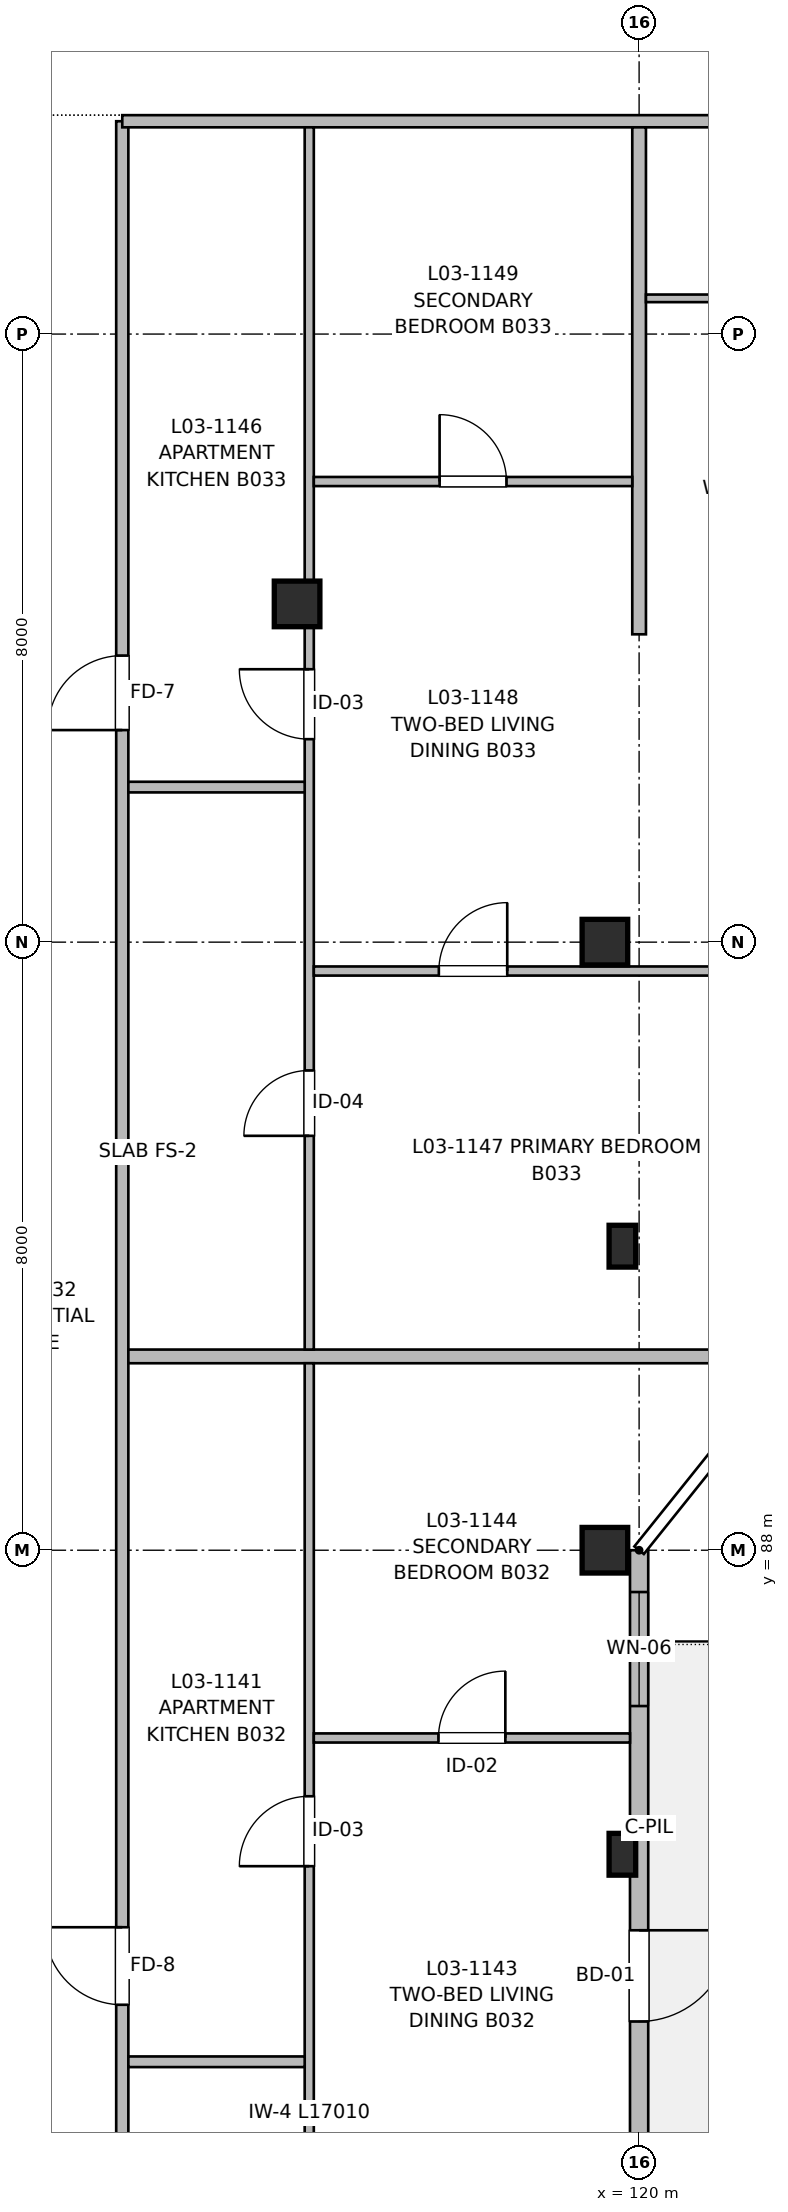
"""IFC4 building model, lengths in metres.
Left out: names, types, materials, properties, quantities, classifications, styles, units other than length and angle.
Written with IfcOpenShell. Run it as: python <this file> out.ifc"""

import sys

from ifc_helpers import new_model, si_unit, direction, frame, frame_2d, origin, origin_2d, place, context, subcontext, project, spatial, rectangle, extrude, element, fill, save


model = new_model("IFC4")
c1 = context("Model", 3, precision=1e-05, world=origin(), true_north=direction((0.0, 1.0)))
c2 = subcontext(c1, "Body", "Model", "MODEL_VIEW")
j1 = project(units=[si_unit("LENGTHUNIT", "METRE"), si_unit("PLANEANGLEUNIT", "RADIAN")], contexts=[c1])
p1 = place(None, origin())
s1 = spatial("IfcSite", under=j1, at=p1, CompositionType="ELEMENT")
p2 = place(p1, origin())
s2 = spatial("IfcBuilding", under=s1, at=p2, CompositionType="ELEMENT")
p3 = place(p2, frame((0.0, 0.0, 10.56)))
s3 = spatial("IfcBuildingStorey", under=s2, at=p3, CompositionType="ELEMENT", Elevation=10.56)
for number, where, z_axis, x_axis in (
    (1, (115.5, 100.45, 0.0), (0.0, 0.0, 1.0), (1.0, 0.0, 0.0)),
    (2, (119.55, 88.0, 0.0), (0.0, 0.0, 1.0), (1.0, 0.0, 0.0)),
    (3, (119.55, 96.0, 0.0), (0.0, 0.0, 1.0), (1.0, 0.0, 0.0)),
):
    element("IfcColumn", number, at=place(p3, frame(where, z_axis=z_axis, x_axis=x_axis)), inside=s3, PredefinedType="COLUMN", context=c2, shape_type="SweptSolid", body=[
        extrude(rectangle(XDim=0.6, YDim=0.6, at=origin_2d()), origin(), (0.0, 0.0, 1.0), 3.2),
    ])
for number, where, z_axis, x_axis in (
    (4, (119.78, 84.0, 0.0), (0.0, 0.0, 1.0), (1.0, 0.0, 0.0)),
    (5, (119.78, 92.0, 0.0), (0.0, 0.0, 1.0), (1.0, 0.0, 0.0)),
):
    element("IfcColumn", number, at=place(p3, frame(where, z_axis=z_axis, x_axis=x_axis)), inside=s3, PredefinedType="PILASTER", context=c2, shape_type="SweptSolid", body=[
        extrude(rectangle(XDim=0.35, YDim=0.55, at=origin_2d()), origin(), (0.0, 0.0, 1.0), 3.2),
    ])
p4 = place(p3, frame((120.0, 88.0, 0.0), z_axis=(0.0, 0.0, 1.0), x_axis=(0.0, -1.0, 0.0)))
e6 = element("IfcWall", 6, at=p4, inside=s3, PredefinedType="SOLIDWALL", context=c2, shape_type="SweptSolid", body=[
    extrude(rectangle(XDim=32.0, YDim=0.24, at=frame_2d((16.0, 0.0))), origin(), (0.0, 0.0, 1.0), 2.98),
])
p5 = place(p4, frame((5.0, 0.0, 0.0)))
e7 = element("IfcOpeningElement", 7, at=p5, cuts=e6, PredefinedType="OPENING", context=c2, shape_type="SweptSolid", body=[
    extrude(rectangle(XDim=1.2, YDim=2.2, at=frame_2d((0.6, 1.1))), frame((0.0, 0.13, 0.0), z_axis=(0.0, -1.0, 0.0), x_axis=(1.0, 0.0, 0.0)), (0.0, 0.0, 1.0), 0.26),
])
p6 = place(p4, frame((11.15, 0.0, 0.72)))
e8 = element("IfcOpeningElement", 8, at=p6, cuts=e6, PredefinedType="OPENING", context=c2, shape_type="SweptSolid", body=[
    extrude(rectangle(XDim=1.7, YDim=1.5, at=frame_2d((0.85, 0.75))), frame((0.0, 0.13, 0.0), z_axis=(0.0, -1.0, 0.0), x_axis=(1.0, 0.0, 0.0)), (0.0, 0.0, 1.0), 0.26),
])
p7 = place(p4, frame((20.65, 0.0, 0.57)))
e9 = element("IfcOpeningElement", 9, at=p7, cuts=e6, PredefinedType="OPENING", context=c2, shape_type="SweptSolid", body=[
    extrude(rectangle(XDim=2.3, YDim=1.65, at=frame_2d((1.15, 0.825))), frame((0.0, 0.13, 0.0), z_axis=(0.0, -1.0, 0.0), x_axis=(1.0, 0.0, 0.0)), (0.0, 0.0, 1.0), 0.26),
])
p8 = place(p4, frame((27.275, 0.0, 0.77)))
e10 = element("IfcOpeningElement", 10, at=p8, cuts=e6, PredefinedType="OPENING", context=c2, shape_type="SweptSolid", body=[
    extrude(rectangle(XDim=1.45, YDim=1.45, at=frame_2d((0.725, 0.725))), frame((0.0, 0.13, 0.0), z_axis=(0.0, -1.0, 0.0), x_axis=(1.0, 0.0, 0.0)), (0.0, 0.0, 1.0), 0.26),
])
p9 = place(p4, frame((16.435, 0.0, 0.82)))
e11 = element("IfcOpeningElement", 11, at=p9, cuts=e6, PredefinedType="OPENING", context=c2, shape_type="SweptSolid", body=[
    extrude(rectangle(XDim=1.5, YDim=1.4, at=frame_2d((0.75, 0.7))), frame((0.0, 0.13, 0.0), z_axis=(0.0, -1.0, 0.0), x_axis=(1.0, 0.0, 0.0)), (0.0, 0.0, 1.0), 0.26),
])
p10 = place(p4, frame((0.55, 0.0, 0.82)))
e12 = element("IfcOpeningElement", 12, at=p10, cuts=e6, PredefinedType="OPENING", context=c2, shape_type="SweptSolid", body=[
    extrude(rectangle(XDim=1.5, YDim=1.4, at=frame_2d((0.75, 0.7))), frame((0.0, 0.13, 0.0), z_axis=(0.0, -1.0, 0.0), x_axis=(1.0, 0.0, 0.0)), (0.0, 0.0, 1.0), 0.26),
])
p11 = place(p3, frame((113.2, 56.18, 0.0), z_axis=(0.0, 0.0, 1.0), x_axis=(0.0, 1.0, 0.0)))
e13 = element("IfcWall", 13, at=p11, inside=s3, PredefinedType="PARTITIONING", context=c2, shape_type="SweptSolid", body=[
    extrude(rectangle(XDim=50.62, YDim=0.16, at=frame_2d((25.31, 0.0))), origin(), (0.0, 0.0, 1.0), 2.935),
])
p12 = place(p11, frame((8.61, 0.0, 0.0)))
e14 = element("IfcOpeningElement", 14, at=p12, cuts=e13, PredefinedType="OPENING", context=c2, shape_type="SweptSolid", body=[
    extrude(rectangle(XDim=0.98, YDim=2.15, at=frame_2d((0.49, 1.075))), frame((0.0, 0.09, 0.0), z_axis=(0.0, -1.0, 0.0), x_axis=(1.0, 0.0, 0.0)), (0.0, 0.0, 1.0), 0.18),
])
p13 = place(p11, frame((25.84, 0.0, 0.0)))
e15 = element("IfcOpeningElement", 15, at=p13, cuts=e13, PredefinedType="OPENING", context=c2, shape_type="SweptSolid", body=[
    extrude(rectangle(XDim=1.02, YDim=2.15, at=frame_2d((0.51, 1.075))), frame((0.0, 0.09, 0.0), z_axis=(0.0, -1.0, 0.0), x_axis=(1.0, 0.0, 0.0)), (0.0, 0.0, 1.0), 0.18),
])
p14 = place(p11, frame((42.61, 0.0, 0.0)))
e16 = element("IfcOpeningElement", 16, at=p14, cuts=e13, PredefinedType="OPENING", context=c2, shape_type="SweptSolid", body=[
    extrude(rectangle(XDim=0.98, YDim=2.15, at=frame_2d((0.49, 1.075))), frame((0.0, 0.09, 0.0), z_axis=(0.0, -1.0, 0.0), x_axis=(1.0, 0.0, 0.0)), (0.0, 0.0, 1.0), 0.18),
])
p15 = place(p3, frame((113.2, 106.8, 0.0), z_axis=(0.0, 0.0, 1.0), x_axis=(1.0, 0.0, 0.0)))
e17 = element("IfcWall", 17, at=p15, inside=s3, PredefinedType="PARTITIONING", context=c2, shape_type="SweptSolid", body=[
    extrude(rectangle(XDim=24.12, YDim=0.16, at=frame_2d((12.06, 0.0))), origin(), (0.0, 0.0, 1.0), 2.935),
])
p16 = place(p15, frame((19.575, 0.0, 0.0)))
e18 = element("IfcOpeningElement", 18, at=p16, cuts=e17, PredefinedType="OPENING", context=c2, shape_type="SweptSolid", body=[
    extrude(rectangle(XDim=1.05, YDim=2.15, at=frame_2d((0.525, 1.075))), frame((0.0, 0.09, 0.0), z_axis=(0.0, -1.0, 0.0), x_axis=(1.0, 0.0, 0.0)), (0.0, 0.0, 1.0), 0.18),
])
p17 = place(p15, frame((8.995, 0.0, 0.0)))
e19 = element("IfcOpeningElement", 19, at=p17, cuts=e17, PredefinedType="OPENING", context=c2, shape_type="SweptSolid", body=[
    extrude(rectangle(XDim=0.98, YDim=2.15, at=frame_2d((0.49, 1.075))), frame((0.0, 0.09, 0.0), z_axis=(0.0, -1.0, 0.0), x_axis=(1.0, 0.0, 0.0)), (0.0, 0.0, 1.0), 0.18),
])
p18 = place(p3, frame((120.0, 100.05, 0.0), z_axis=(0.0, 0.0, 1.0), x_axis=(0.0, 1.0, 0.0)))
e20 = element("IfcWall", 20, at=p18, inside=s3, PredefinedType="PARTITIONING", context=c2, shape_type="SweptSolid", body=[
    extrude(rectangle(XDim=6.67, YDim=0.18, at=frame_2d((3.335, 0.0))), origin(), (0.0, 0.0, 1.0), 2.935),
])
p19 = place(p3, frame((113.28, 90.55, 0.0), z_axis=(0.0, 0.0, 1.0), x_axis=(1.0, 0.0, 0.0)))
e21 = element("IfcWall", 21, at=p19, inside=s3, PredefinedType="PARTITIONING", context=c2, shape_type="SweptSolid", body=[
    extrude(rectangle(XDim=8.714, YDim=0.18, at=frame_2d((4.357, 0.0))), origin(), (0.0, 0.0, 1.0), 2.935),
])
p20 = place(p3, frame((115.66, 73.45, 0.0), z_axis=(0.0, 0.0, 1.0), x_axis=(0.0, 1.0, 0.0)))
e22 = element("IfcWall", 22, at=p20, inside=s3, PredefinedType="PARTITIONING", context=c2, shape_type="SweptSolid", body=[
    extrude(rectangle(XDim=17.01, YDim=0.12, at=frame_2d((8.505, 0.0))), origin(), (0.0, 0.0, 1.0), 2.935),
])
p21 = place(p20, frame((2.972, 0.0, 0.0)))
e23 = element("IfcOpeningElement", 23, at=p21, cuts=e22, PredefinedType="OPENING", context=c2, shape_type="SweptSolid", body=[
    extrude(rectangle(XDim=0.94, YDim=2.1, at=frame_2d((0.47, 1.05))), frame((0.0, 0.07, 0.0), z_axis=(0.0, -1.0, 0.0), x_axis=(1.0, 0.0, 0.0)), (0.0, 0.0, 1.0), 0.14),
])
p22 = place(p20, frame((10.393, 0.0, 0.0)))
e24 = element("IfcOpeningElement", 24, at=p22, cuts=e22, PredefinedType="OPENING", context=c2, shape_type="SweptSolid", body=[
    extrude(rectangle(XDim=0.92, YDim=2.1, at=frame_2d((0.46, 1.05))), frame((0.0, 0.07, 0.0), z_axis=(0.0, -1.0, 0.0), x_axis=(1.0, 0.0, 0.0)), (0.0, 0.0, 1.0), 0.14),
])
p23 = place(p3, frame((113.28, 81.27, 0.0), z_axis=(0.0, 0.0, 1.0), x_axis=(1.0, 0.0, 0.0)))
e25 = element("IfcWall", 25, at=p23, inside=s3, PredefinedType="PARTITIONING", context=c2, shape_type="SweptSolid", body=[
    extrude(rectangle(XDim=2.32, YDim=0.14, at=frame_2d((1.16, 0.0))), origin(), (0.0, 0.0, 1.0), 2.935),
])
p24 = place(p3, frame((115.72, 85.53, 0.0), z_axis=(0.0, 0.0, 1.0), x_axis=(1.0, 0.0, 0.0)))
e26 = element("IfcWall", 26, at=p24, inside=s3, PredefinedType="PARTITIONING", context=c2, shape_type="SweptSolid", body=[
    extrude(rectangle(XDim=4.16, YDim=0.12, at=frame_2d((2.08, 0.0))), origin(), (0.0, 0.0, 1.0), 2.935),
])
p25 = place(p24, frame((1.64, 0.0, 0.0)))
e27 = element("IfcOpeningElement", 27, at=p25, cuts=e26, PredefinedType="OPENING", context=c2, shape_type="SweptSolid", body=[
    extrude(rectangle(XDim=0.88, YDim=2.1, at=frame_2d((0.44, 1.05))), frame((0.0, 0.07, 0.0), z_axis=(0.0, -1.0, 0.0), x_axis=(1.0, 0.0, 0.0)), (0.0, 0.0, 1.0), 0.14),
])
p26 = place(p3, frame((115.66, 90.64, 0.0), z_axis=(0.0, 0.0, 1.0), x_axis=(0.0, 1.0, 0.0)))
e28 = element("IfcWall", 28, at=p26, inside=s3, PredefinedType="PARTITIONING", context=c2, shape_type="SweptSolid", body=[
    extrude(rectangle(XDim=16.08, YDim=0.12, at=frame_2d((8.04, 0.0))), origin(), (0.0, 0.0, 1.0), 2.68),
])
p27 = place(p26, frame((2.812, 0.0, 0.0)))
e29 = element("IfcOpeningElement", 29, at=p27, cuts=e28, PredefinedType="OPENING", context=c2, shape_type="SweptSolid", body=[
    extrude(rectangle(XDim=0.86, YDim=2.1, at=frame_2d((0.43, 1.05))), frame((0.0, 0.07, 0.0), z_axis=(0.0, -1.0, 0.0), x_axis=(1.0, 0.0, 0.0)), (0.0, 0.0, 1.0), 0.14),
])
p28 = place(p26, frame((8.031, 0.0, 0.0)))
e30 = element("IfcOpeningElement", 30, at=p28, cuts=e28, PredefinedType="OPENING", context=c2, shape_type="SweptSolid", body=[
    extrude(rectangle(XDim=0.92, YDim=2.1, at=frame_2d((0.46, 1.05))), frame((0.0, 0.07, 0.0), z_axis=(0.0, -1.0, 0.0), x_axis=(1.0, 0.0, 0.0)), (0.0, 0.0, 1.0), 0.14),
])
p29 = place(p3, frame((113.28, 98.04, 0.0), z_axis=(0.0, 0.0, 1.0), x_axis=(1.0, 0.0, 0.0)))
e31 = element("IfcWall", 31, at=p29, inside=s3, PredefinedType="PARTITIONING", context=c2, shape_type="SweptSolid", body=[
    extrude(rectangle(XDim=2.32, YDim=0.14, at=frame_2d((1.16, 0.0))), origin(), (0.0, 0.0, 1.0), 2.935),
])
p30 = place(p3, frame((115.72, 95.62, 0.0), z_axis=(0.0, 0.0, 1.0), x_axis=(1.0, 0.0, 0.0)))
e32 = element("IfcWall", 32, at=p30, inside=s3, PredefinedType="PARTITIONING", context=c2, shape_type="SweptSolid", body=[
    extrude(rectangle(XDim=10.968, YDim=0.12, at=frame_2d((5.484, 0.0))), origin(), (0.0, 0.0, 1.0), 2.935),
])
p31 = place(p30, frame((1.645, 0.0, 0.0)))
e33 = element("IfcOpeningElement", 33, at=p31, cuts=e32, PredefinedType="OPENING", context=c2, shape_type="SweptSolid", body=[
    extrude(rectangle(XDim=0.9, YDim=2.1, at=frame_2d((0.45, 1.05))), frame((0.0, 0.07, 0.0), z_axis=(0.0, -1.0, 0.0), x_axis=(1.0, 0.0, 0.0)), (0.0, 0.0, 1.0), 0.14),
])
p32 = place(p3, frame((115.72, 102.06, 0.0), z_axis=(0.0, 0.0, 1.0), x_axis=(1.0, 0.0, 0.0)))
e34 = element("IfcWall", 34, at=p32, inside=s3, PredefinedType="PARTITIONING", context=c2, shape_type="SweptSolid", body=[
    extrude(rectangle(XDim=4.19, YDim=0.12, at=frame_2d((2.095, 0.0))), origin(), (0.0, 0.0, 1.0), 2.935),
])
p33 = place(p32, frame((1.655, 0.0, 0.0)))
e35 = element("IfcOpeningElement", 35, at=p33, cuts=e34, PredefinedType="OPENING", context=c2, shape_type="SweptSolid", body=[
    extrude(rectangle(XDim=0.88, YDim=2.1, at=frame_2d((0.44, 1.05))), frame((0.0, 0.07, 0.0), z_axis=(0.0, -1.0, 0.0), x_axis=(1.0, 0.0, 0.0)), (0.0, 0.0, 1.0), 0.14),
])
p34 = place(p3, frame((120.09, 104.47, 0.0), z_axis=(0.0, 0.0, 1.0), x_axis=(1.0, 0.0, 0.0)))
e36 = element("IfcWall", 36, at=p34, inside=s3, PredefinedType="PARTITIONING", context=c2, shape_type="SweptSolid", body=[
    extrude(rectangle(XDim=5.13, YDim=0.1, at=frame_2d((2.565, 0.0))), origin(), (0.0, 0.0, 1.0), 2.935),
])
p35 = place(p34, frame((2.18, 0.0, 0.0)))
e37 = element("IfcOpeningElement", 37, at=p35, cuts=e36, PredefinedType="OPENING", context=c2, shape_type="SweptSolid", body=[
    extrude(rectangle(XDim=0.92, YDim=2.1, at=frame_2d((0.46, 1.05))), frame((0.0, 0.06, 0.0), z_axis=(0.0, -1.0, 0.0), x_axis=(1.0, 0.0, 0.0)), (0.0, 0.0, 1.0), 0.12),
])
p36 = place(p5, origin())
e38 = element("IfcDoor", 38, at=p36, inside=s3, OperationType="SINGLE_SWING_LEFT", PredefinedType="DOOR", context=c2, shape_type="SweptSolid", body=[
    extrude(rectangle(XDim=1.2, YDim=2.2, at=frame_2d((0.6, 1.1))), frame((0.0, 0.025, 0.0), z_axis=(0.0, -1.0, 0.0), x_axis=(1.0, 0.0, 0.0)), (0.0, 0.0, 1.0), 0.05),
])
fill(e7, e38)
p37 = place(p22, origin())
e39 = element("IfcDoor", 39, at=p37, inside=s3, OperationType="SINGLE_SWING_LEFT", PredefinedType="DOOR", context=c2, shape_type="SweptSolid", body=[
    extrude(rectangle(XDim=0.92, YDim=2.1, at=frame_2d((0.46, 1.05))), frame((0.0, 0.025, 0.0), z_axis=(0.0, -1.0, 0.0), x_axis=(1.0, 0.0, 0.0)), (0.0, 0.0, 1.0), 0.05),
])
fill(e24, e39)
p38 = place(p13, origin())
e40 = element("IfcDoor", 40, at=p38, inside=s3, OperationType="SINGLE_SWING_RIGHT", PredefinedType="DOOR", context=c2, shape_type="SweptSolid", body=[
    extrude(rectangle(XDim=1.02, YDim=2.15, at=frame_2d((0.51, 1.075))), frame((0.0, 0.025, 0.0), z_axis=(0.0, -1.0, 0.0), x_axis=(1.0, 0.0, 0.0)), (0.0, 0.0, 1.0), 0.05),
])
fill(e15, e40)
p39 = place(p25, origin())
e41 = element("IfcDoor", 41, at=p39, inside=s3, OperationType="SINGLE_SWING_RIGHT", PredefinedType="DOOR", context=c2, shape_type="SweptSolid", body=[
    extrude(rectangle(XDim=0.88, YDim=2.1, at=frame_2d((0.44, 1.05))), frame((0.0, 0.025, 0.0), z_axis=(0.0, -1.0, 0.0), x_axis=(1.0, 0.0, 0.0)), (0.0, 0.0, 1.0), 0.05),
])
fill(e27, e41)
p40 = place(p27, origin())
e42 = element("IfcDoor", 42, at=p40, inside=s3, OperationType="SINGLE_SWING_LEFT", PredefinedType="DOOR", context=c2, shape_type="SweptSolid", body=[
    extrude(rectangle(XDim=0.86, YDim=2.1, at=frame_2d((0.43, 1.05))), frame((0.0, 0.025, 0.0), z_axis=(0.0, -1.0, 0.0), x_axis=(1.0, 0.0, 0.0)), (0.0, 0.0, 1.0), 0.05),
])
fill(e29, e42)
p41 = place(p28, origin())
e43 = element("IfcDoor", 43, at=p41, inside=s3, OperationType="SINGLE_SWING_RIGHT", PredefinedType="DOOR", context=c2, shape_type="SweptSolid", body=[
    extrude(rectangle(XDim=0.92, YDim=2.1, at=frame_2d((0.46, 1.05))), frame((0.0, 0.025, 0.0), z_axis=(0.0, -1.0, 0.0), x_axis=(1.0, 0.0, 0.0)), (0.0, 0.0, 1.0), 0.05),
])
fill(e30, e43)
p42 = place(p14, origin())
e44 = element("IfcDoor", 44, at=p42, inside=s3, OperationType="SINGLE_SWING_LEFT", PredefinedType="DOOR", context=c2, shape_type="SweptSolid", body=[
    extrude(rectangle(XDim=0.98, YDim=2.15, at=frame_2d((0.49, 1.075))), frame((0.0, 0.025, 0.0), z_axis=(0.0, -1.0, 0.0), x_axis=(1.0, 0.0, 0.0)), (0.0, 0.0, 1.0), 0.05),
])
fill(e16, e44)
p43 = place(p31, origin())
e45 = element("IfcDoor", 45, at=p43, inside=s3, OperationType="SINGLE_SWING_RIGHT", PredefinedType="DOOR", context=c2, shape_type="SweptSolid", body=[
    extrude(rectangle(XDim=0.9, YDim=2.1, at=frame_2d((0.45, 1.05))), frame((0.0, 0.025, 0.0), z_axis=(0.0, -1.0, 0.0), x_axis=(1.0, 0.0, 0.0)), (0.0, 0.0, 1.0), 0.05),
])
fill(e33, e45)
p44 = place(p33, origin())
e46 = element("IfcDoor", 46, at=p44, inside=s3, OperationType="SINGLE_SWING_LEFT", PredefinedType="DOOR", context=c2, shape_type="SweptSolid", body=[
    extrude(rectangle(XDim=0.88, YDim=2.1, at=frame_2d((0.44, 1.05))), frame((0.0, 0.025, 0.0), z_axis=(0.0, -1.0, 0.0), x_axis=(1.0, 0.0, 0.0)), (0.0, 0.0, 1.0), 0.05),
])
fill(e35, e46)
p45 = place(p10, origin())
e47 = element("IfcWindow", 47, at=p45, inside=s3, PartitioningType="SINGLE_PANEL", PredefinedType="WINDOW", context=c2, shape_type="SweptSolid", body=[
    extrude(rectangle(XDim=1.5, YDim=1.4, at=frame_2d((0.75, 0.7))), frame((0.0, 0.03, 0.0), z_axis=(0.0, -1.0, 0.0), x_axis=(1.0, 0.0, 0.0)), (0.0, 0.0, 1.0), 0.06),
])
fill(e12, e47)
save(model, sys.argv[1])
